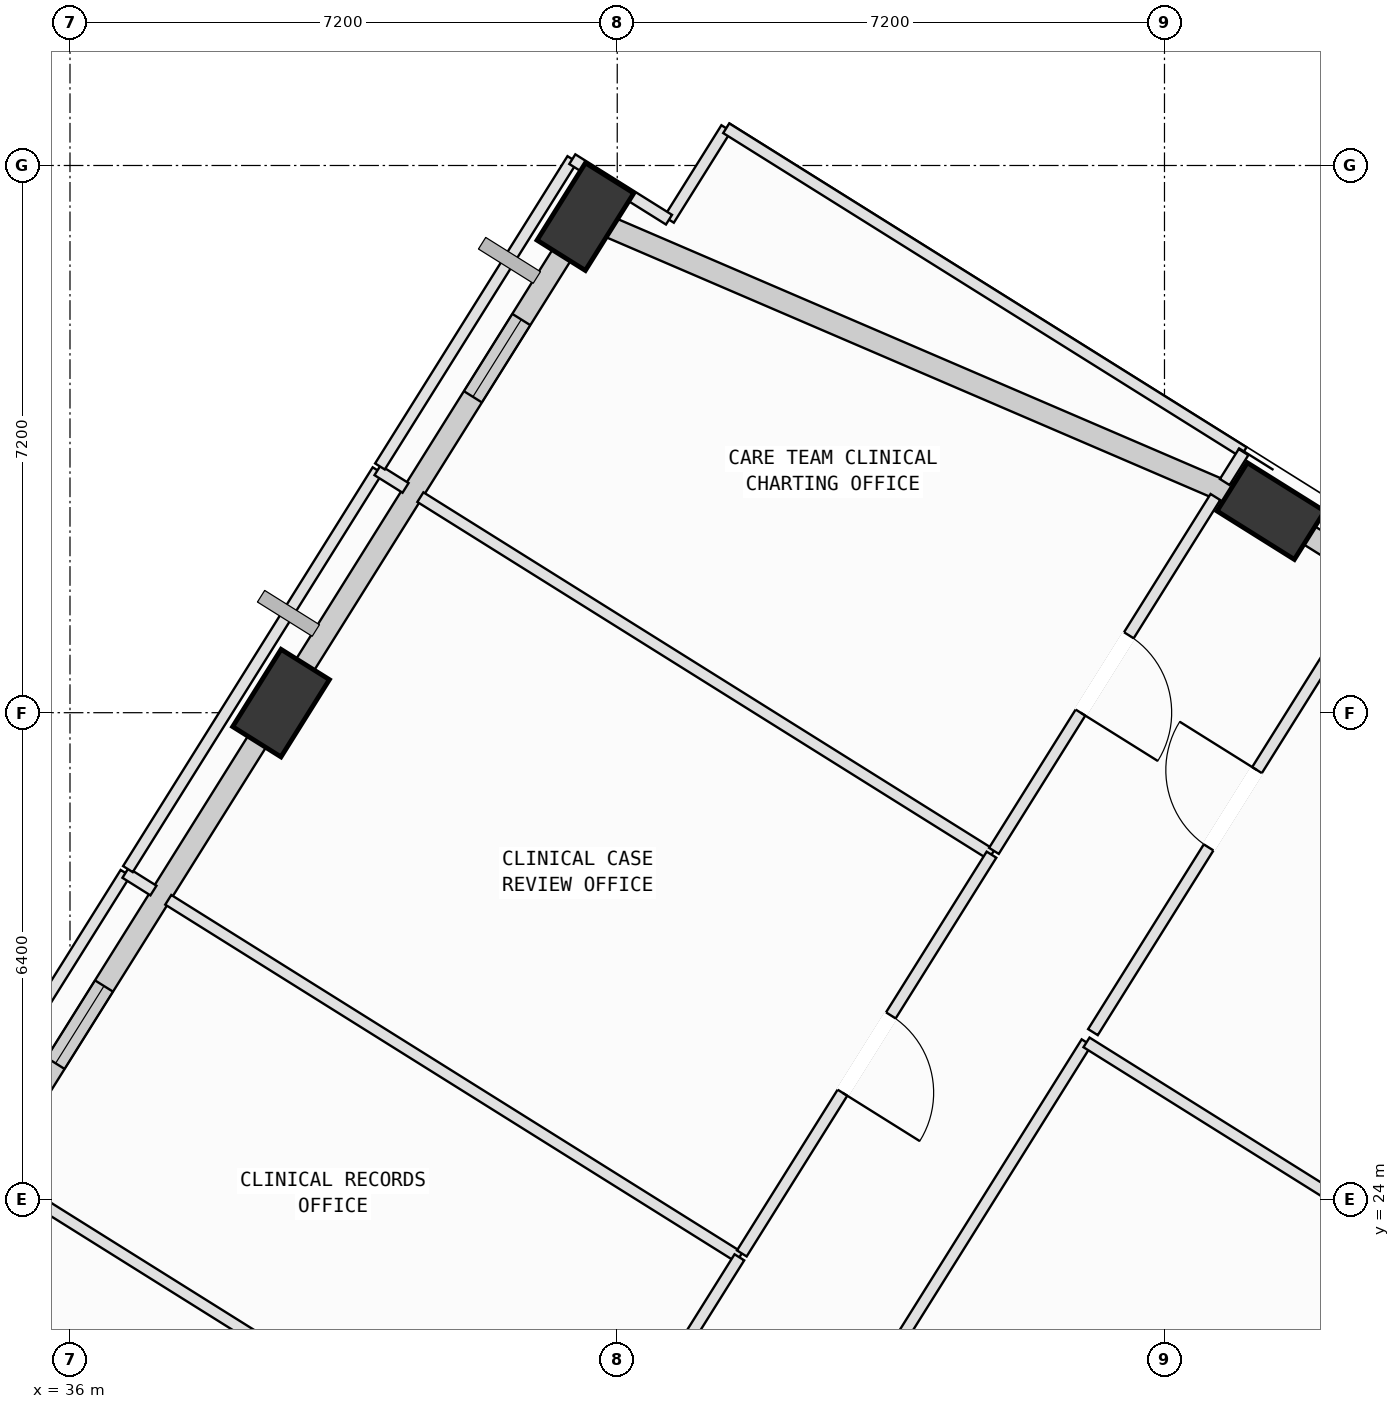
"""IFC4 building model, lengths in metres.
Left out: names, types, materials, properties, quantities, classifications, styles, units other than length and angle.
Written with IfcOpenShell. Run it as: python <this file> out.ifc"""

import sys

from ifc_helpers import new_model, si_unit, direction, frame, frame_2d, origin, origin_2d, place, context, subcontext, project, spatial, rectangle, extrude, element, fill, save


model = new_model("IFC4")
c1 = context("Model", 3, precision=1e-05, world=origin(), true_north=direction((0.0, 1.0)))
c2 = subcontext(c1, "Body", "Model", "MODEL_VIEW")
j1 = project(units=[si_unit("LENGTHUNIT", "METRE"), si_unit("PLANEANGLEUNIT", "RADIAN")], contexts=[c1])
p1 = place(None, origin())
s1 = spatial("IfcSite", under=j1, at=p1, CompositionType="ELEMENT")
p2 = place(p1, origin())
s2 = spatial("IfcBuilding", under=s1, at=p2, CompositionType="ELEMENT")
p3 = place(p2, frame((0.0, 0.0, 272.6)))
s3 = spatial("IfcBuildingStorey", under=s2, at=p3, CompositionType="ELEMENT", Elevation=272.6)
p4 = place(p3, frame((51.799, 33.053, 0.055), z_axis=(-0.034677853614, 0.074909100156, 0.996587213034), x_axis=(0.991334077794, -0.123846479581, 0.043804060302)))
e1 = element("IfcColumn", 1, at=p4, inside=s3, PredefinedType="COLUMN", context=c2, shape_type="SweptSolid", body=[
    extrude(rectangle(XDim=1.2, YDim=0.75, at=origin_2d()), origin(), (0.0, 0.0, 1.0), 3.957),
])
p5 = place(p3, frame((42.781, 36.926, 0.047), z_axis=(-0.050443698511, 0.037555271875, 0.998020558323), x_axis=(0.361618651601, -0.930801106737, 0.053303381798)))
e2 = element("IfcColumn", 2, at=p5, inside=s3, PredefinedType="COLUMN", context=c2, shape_type="SweptSolid", body=[
    extrude(rectangle(XDim=1.2, YDim=0.75, at=origin_2d()), origin(), (0.0, 0.0, 1.0), 3.959),
])
p6 = place(p3, frame((38.777, 30.526, 0.025), z_axis=(-0.023892403332, 0.021251340753, 0.999488636043), x_axis=(0.280312393395, -0.959526144156, 0.02710241301)))
e3 = element("IfcColumn", 3, at=p6, inside=s3, PredefinedType="COLUMN", context=c2, shape_type="SweptSolid", body=[
    extrude(rectangle(XDim=1.2, YDim=0.75, at=origin_2d()), origin(), (0.0, 0.0, 1.0), 3.975),
])
p7 = place(p3, frame((52.012, 32.917, 0.0), z_axis=(0.0, 0.0, 1.0), x_axis=(0.847583441626, -0.530662142499, 0.0)))
e4 = element("IfcWall", 4, at=p7, inside=s3, PredefinedType="SOLIDWALL", context=c2, shape_type="SweptSolid", body=[
    extrude(rectangle(XDim=7.046, YDim=0.28, at=frame_2d((3.523, 0.0))), origin(), (0.0, 0.0, 1.0), 3.265),
])
p8 = place(p3, frame((43.035, 36.816, 0.0), z_axis=(0.0, 0.0, 1.0), x_axis=(0.918725262251, -0.394897318935, 0.0)))
e5 = element("IfcWall", 5, at=p8, inside=s3, PredefinedType="SOLIDWALL", context=c2, shape_type="SweptSolid", body=[
    extrude(rectangle(XDim=9.036, YDim=0.28, at=frame_2d((4.518, 0.0))), origin(), (0.0, 0.0, 1.0), 3.265),
])
p9 = place(p3, frame((38.991, 30.867, 0.0), z_axis=(0.0, 0.0, 1.0), x_axis=(0.530665550712, 0.847581307774, 0.0)))
e6 = element("IfcWall", 6, at=p9, inside=s3, PredefinedType="SOLIDWALL", context=c2, shape_type="SweptSolid", body=[
    extrude(rectangle(XDim=6.78, YDim=0.28, at=frame_2d((3.39, 0.0))), origin(), (0.0, 0.0, 1.0), 2.765),
])
p10 = place(p9, frame((4.353, 0.0, 0.75)))
e7 = element("IfcOpeningElement", 7, at=p10, cuts=e6, PredefinedType="OPENING", context=c2, shape_type="SweptSolid", body=[
    extrude(rectangle(XDim=1.2, YDim=1.75, at=frame_2d((0.6, 0.875))), frame((0.0, 0.15, 0.0), z_axis=(0.0, -1.0, 0.0), x_axis=(1.0, 0.0, 0.0)), (0.0, 0.0, 1.0), 0.3),
])
p11 = place(p3, frame((35.173, 24.769, 0.0), z_axis=(0.0, 0.0, 1.0), x_axis=(0.530669842766, 0.84757862053, 0.0)))
e8 = element("IfcWall", 8, at=p11, inside=s3, PredefinedType="SOLIDWALL", context=c2, shape_type="SweptSolid", body=[
    extrude(rectangle(XDim=6.41, YDim=0.28, at=frame_2d((3.205, 0.0))), origin(), (0.0, 0.0, 1.0), 2.765),
])
p12 = place(p11, frame((1.201, 0.0, 0.75)))
e9 = element("IfcOpeningElement", 9, at=p12, cuts=e8, PredefinedType="OPENING", context=c2, shape_type="SweptSolid", body=[
    extrude(rectangle(XDim=1.2, YDim=1.75, at=frame_2d((0.6, 0.875))), frame((0.0, 0.15, 0.0), z_axis=(0.0, -1.0, 0.0), x_axis=(1.0, 0.0, 0.0)), (0.0, 0.0, 1.0), 0.3),
])
p13 = place(p3, frame((42.878, 15.687, 0.0), z_axis=(0.0, 0.0, 1.0), x_axis=(0.530687191851, 0.847567758002, 0.0)))
e10 = element("IfcWall", 10, at=p13, inside=s3, PredefinedType="PARTITIONING", context=c2, shape_type="SweptSolid", body=[
    extrude(rectangle(XDim=12.241, YDim=0.15, at=frame_2d((6.121, 0.0))), origin(), (0.0, 0.0, 1.0), 3.415),
])
p14 = place(p13, frame((5.521, 0.0, 0.0)))
e11 = element("IfcOpeningElement", 11, at=p14, cuts=e10, PredefinedType="OPENING", context=c2, shape_type="SweptSolid", body=[
    extrude(rectangle(XDim=1.2, YDim=2.15, at=frame_2d((0.6, 1.075))), frame((0.0, 0.085, 0.0), z_axis=(0.0, -1.0, 0.0), x_axis=(1.0, 0.0, 0.0)), (0.0, 0.0, 1.0), 0.17),
])
p15 = place(p3, frame((49.374, 26.062, 0.0), z_axis=(0.0, 0.0, 1.0), x_axis=(0.847573559708, -0.530677925756, 0.0)))
e12 = element("IfcWall", 12, at=p15, inside=s3, PredefinedType="PARTITIONING", context=c2, shape_type="SweptSolid", body=[
    extrude(rectangle(XDim=9.435, YDim=0.15, at=frame_2d((4.718, 0.0))), origin(), (0.0, 0.0, 1.0), 3.78),
])
p16 = place(p3, frame((49.459, 26.197, 0.0), z_axis=(0.0, 0.0, 1.0), x_axis=(0.530644342524, 0.847594585723, 0.0)))
e13 = element("IfcWall", 13, at=p16, inside=s3, PredefinedType="PARTITIONING", context=c2, shape_type="SweptSolid", body=[
    extrude(rectangle(XDim=6.935, YDim=0.15, at=frame_2d((3.467, 0.0))), origin(), (0.0, 0.0, 1.0), 3.78),
])
p17 = place(p16, frame((2.867, 0.0, 0.0)))
e14 = element("IfcOpeningElement", 14, at=p17, cuts=e13, PredefinedType="OPENING", context=c2, shape_type="SweptSolid", body=[
    extrude(rectangle(XDim=1.2, YDim=2.15, at=frame_2d((0.6, 1.075))), frame((0.0, 0.085, 0.0), z_axis=(0.0, -1.0, 0.0), x_axis=(1.0, 0.0, 0.0)), (0.0, 0.0, 1.0), 0.17),
])
p18 = place(p3, frame((34.462, 24.67, 0.0), z_axis=(0.0, 0.0, 1.0), x_axis=(0.847549004831, -0.53071714162, 0.0)))
e15 = element("IfcWall", 15, at=p18, inside=s3, PredefinedType="PARTITIONING", context=c2, shape_type="SweptSolid", body=[
    extrude(rectangle(XDim=9.5, YDim=0.15, at=frame_2d((4.75, 0.0))), origin(), (0.0, 0.0, 1.0), 3.78),
])
p19 = place(p3, frame((34.473, 24.687, 0.0), z_axis=(0.0, 0.0, 1.0), x_axis=(0.530772811919, 0.84751414273, 0.0)))
e16 = element("IfcWall", 16, at=p19, inside=s3, PredefinedType="PARTITIONING", context=c2, shape_type="SweptSolid", body=[
    extrude(rectangle(XDim=4.252, YDim=0.15, at=frame_2d((2.126, 0.0))), origin(), (0.0, 0.0, 1.0), 3.78),
])
p20 = place(p3, frame((36.73, 28.291, 0.0), z_axis=(0.0, 0.0, 1.0), x_axis=(0.846954729699, -0.531665012804, 0.0)))
e17 = element("IfcWall", 17, at=p20, inside=s3, PredefinedType="PARTITIONING", context=c2, shape_type="SweptSolid", body=[
    extrude(rectangle(XDim=0.434, YDim=0.15, at=frame_2d((0.217, 0.0))), origin(), (0.0, 0.0, 1.0), 3.78),
])
p21 = place(p3, frame((37.293, 27.938, 0.0), z_axis=(0.0, 0.0, 1.0), x_axis=(0.847597339737, -0.530639943531, 0.0)))
e18 = element("IfcWall", 18, at=p21, inside=s3, PredefinedType="PARTITIONING", context=c2, shape_type="SweptSolid", body=[
    extrude(rectangle(XDim=8.865, YDim=0.15, at=frame_2d((4.433, 0.0))), origin(), (0.0, 0.0, 1.0), 3.78),
])
p22 = place(p3, frame((44.807, 23.234, 0.0), z_axis=(0.0, 0.0, 1.0), x_axis=(-0.530702319906, -0.847558285693, 0.0)))
e19 = element("IfcWall", 19, at=p22, inside=s3, PredefinedType="PARTITIONING", context=c2, shape_type="SweptSolid", body=[
    extrude(rectangle(XDim=4.273, YDim=0.15, at=frame_2d((2.137, 0.0))), origin(), (0.0, 0.0, 1.0), 3.78),
])
p23 = place(p22, frame((1.537, 0.0, 0.0)))
e20 = element("IfcOpeningElement", 20, at=p23, cuts=e19, PredefinedType="OPENING", context=c2, shape_type="SweptSolid", body=[
    extrude(rectangle(XDim=1.2, YDim=2.15, at=frame_2d((0.6, 1.075))), frame((0.0, 0.085, 0.0), z_axis=(0.0, -1.0, 0.0), x_axis=(1.0, 0.0, 0.0)), (0.0, 0.0, 1.0), 0.17),
])
p24 = place(p3, frame((36.762, 28.342, 0.0), z_axis=(0.0, 0.0, 1.0), x_axis=(0.530523539414, 0.847670203634, 0.0)))
e21 = element("IfcWall", 21, at=p24, inside=s3, PredefinedType="PARTITIONING", context=c2, shape_type="SweptSolid", body=[
    extrude(rectangle(XDim=6.19, YDim=0.15, at=frame_2d((3.095, 0.0))), origin(), (0.0, 0.0, 1.0), 2.765),
])
p25 = place(p3, frame((40.046, 33.589, 0.0), z_axis=(0.0, 0.0, 1.0), x_axis=(0.847494089862, -0.530804830092, 0.0)))
e22 = element("IfcWall", 22, at=p25, inside=s3, PredefinedType="PARTITIONING", context=c2, shape_type="SweptSolid", body=[
    extrude(rectangle(XDim=0.436, YDim=0.15, at=frame_2d((0.218, 0.0))), origin(), (0.0, 0.0, 1.0), 3.78),
])
p26 = place(p3, frame((40.61, 33.236, 0.0), z_axis=(0.0, 0.0, 1.0), x_axis=(0.847597339737, -0.530639943531, 0.0)))
e23 = element("IfcWall", 23, at=p26, inside=s3, PredefinedType="PARTITIONING", context=c2, shape_type="SweptSolid", body=[
    extrude(rectangle(XDim=8.865, YDim=0.15, at=frame_2d((4.433, 0.0))), origin(), (0.0, 0.0, 1.0), 3.78),
])
p27 = place(p3, frame((48.124, 28.532, 0.0), z_axis=(0.0, 0.0, 1.0), x_axis=(-0.530636886246, -0.847599253749, 0.0)))
e24 = element("IfcWall", 24, at=p27, inside=s3, PredefinedType="PARTITIONING", context=c2, shape_type="SweptSolid", body=[
    extrude(rectangle(XDim=6.19, YDim=0.15, at=frame_2d((3.095, 0.0))), origin(), (0.0, 0.0, 1.0), 3.78),
])
p28 = place(p27, frame((2.495, 0.0, 0.0)))
e25 = element("IfcOpeningElement", 25, at=p28, cuts=e24, PredefinedType="OPENING", context=c2, shape_type="SweptSolid", body=[
    extrude(rectangle(XDim=1.2, YDim=2.15, at=frame_2d((0.6, 1.075))), frame((0.0, 0.085, 0.0), z_axis=(0.0, -1.0, 0.0), x_axis=(1.0, 0.0, 0.0)), (0.0, 0.0, 1.0), 0.17),
])
p29 = place(p3, frame((43.881, 36.887, 0.0), z_axis=(0.0, 0.0, 1.0), x_axis=(0.530493633922, 0.847688919574, 0.0)))
e26 = element("IfcWall", 26, at=p29, inside=s3, PredefinedType="PARTITIONING", context=c2, shape_type="SweptSolid", body=[
    extrude(rectangle(XDim=1.419, YDim=0.15, at=frame_2d((0.709, 0.0))), origin(), (0.0, 0.0, 1.0), 3.78),
])
p30 = place(p3, frame((44.634, 38.09, 0.0), z_axis=(0.0, 0.0, 1.0), x_axis=(0.847589810527, -0.530651969836, 0.0)))
e27 = element("IfcWall", 27, at=p30, inside=s3, PredefinedType="PARTITIONING", context=c2, shape_type="SweptSolid", body=[
    extrude(rectangle(XDim=8.03, YDim=0.15, at=frame_2d((4.015, 0.0))), origin(), (0.0, 0.0, 1.0), 3.265),
])
p31 = place(p3, frame((51.44, 33.829, 0.0), z_axis=(0.0, 0.0, 1.0), x_axis=(-0.530848229426, -0.847466906324, 0.0)))
e28 = element("IfcWall", 28, at=p31, inside=s3, PredefinedType="PARTITIONING", context=c2, shape_type="SweptSolid", body=[
    extrude(rectangle(XDim=0.465, YDim=0.15, at=frame_2d((0.232, 0.0))), origin(), (0.0, 0.0, 1.0), 2.765),
])
p32 = place(p3, frame((51.07, 33.238, 0.0), z_axis=(0.0, 0.0, 1.0), x_axis=(-0.530530213169, -0.847666026755, 0.0)))
e29 = element("IfcWall", 29, at=p32, inside=s3, PredefinedType="PARTITIONING", context=c2, shape_type="SweptSolid", body=[
    extrude(rectangle(XDim=5.493, YDim=0.15, at=frame_2d((2.746, 0.0))), origin(), (0.0, 0.0, 1.0), 2.765),
])
p33 = place(p32, frame((2.146, 0.0, 0.0)))
e30 = element("IfcOpeningElement", 30, at=p33, cuts=e29, PredefinedType="OPENING", context=c2, shape_type="SweptSolid", body=[
    extrude(rectangle(XDim=1.2, YDim=2.15, at=frame_2d((0.6, 1.075))), frame((0.0, 0.085, 0.0), z_axis=(0.0, -1.0, 0.0), x_axis=(1.0, 0.0, 0.0)), (0.0, 0.0, 1.0), 0.17),
])
p34 = place(p3, frame((40.078, 33.64, 0.0), z_axis=(0.0, 0.0, 1.0), x_axis=(0.530601485955, 0.847621414962, 0.0)))
e31 = element("IfcWall", 31, at=p34, inside=s3, PredefinedType="PARTITIONING", context=c2, shape_type="SweptSolid", body=[
    extrude(rectangle(XDim=4.77, YDim=0.15, at=frame_2d((2.385, 0.0))), origin(), (0.0, 0.0, 1.0), 3.265),
])
p35 = place(p3, frame((42.609, 37.683, 0.0), z_axis=(0.0, 0.0, 1.0), x_axis=(0.847696579244, -0.53048139415, 0.0)))
e32 = element("IfcWall", 32, at=p35, inside=s3, PredefinedType="PARTITIONING", context=c2, shape_type="SweptSolid", body=[
    extrude(rectangle(XDim=1.501, YDim=0.15, at=frame_2d((0.75, 0.0))), origin(), (0.0, 0.0, 1.0), 3.265),
])
p36 = place(p10, origin())
e33 = element("IfcWindow", 33, at=p36, inside=s3, PartitioningType="SINGLE_PANEL", PredefinedType="WINDOW", context=c2, shape_type="SweptSolid", body=[
    extrude(rectangle(XDim=1.2, YDim=1.75, at=frame_2d((0.6, 0.875))), frame((0.0, 0.03, 0.0), z_axis=(0.0, -1.0, 0.0), x_axis=(1.0, 0.0, 0.0)), (0.0, 0.0, 1.0), 0.06),
])
fill(e7, e33)
p37 = place(p12, origin())
e34 = element("IfcWindow", 34, at=p37, inside=s3, PartitioningType="SINGLE_PANEL", PredefinedType="WINDOW", context=c2, shape_type="SweptSolid", body=[
    extrude(rectangle(XDim=1.2, YDim=1.75, at=frame_2d((0.6, 0.875))), frame((0.0, 0.03, 0.0), z_axis=(0.0, -1.0, 0.0), x_axis=(1.0, 0.0, 0.0)), (0.0, 0.0, 1.0), 0.06),
])
fill(e9, e34)
p38 = place(p17, origin())
e35 = element("IfcDoor", 35, at=p38, inside=s3, OperationType="SINGLE_SWING_RIGHT", PredefinedType="DOOR", context=c2, shape_type="SweptSolid", body=[
    extrude(rectangle(XDim=1.2, YDim=2.15, at=frame_2d((0.6, 1.075))), frame((0.0, 0.025, 0.0), z_axis=(0.0, -1.0, 0.0), x_axis=(1.0, 0.0, 0.0)), (0.0, 0.0, 1.0), 0.05),
])
fill(e14, e35)
p39 = place(p28, origin())
e36 = element("IfcDoor", 36, at=p39, inside=s3, OperationType="SINGLE_SWING_RIGHT", PredefinedType="DOOR", context=c2, shape_type="SweptSolid", body=[
    extrude(rectangle(XDim=1.2, YDim=2.15, at=frame_2d((0.6, 1.075))), frame((0.0, 0.025, 0.0), z_axis=(0.0, -1.0, 0.0), x_axis=(1.0, 0.0, 0.0)), (0.0, 0.0, 1.0), 0.05),
])
fill(e25, e36)
p40 = place(p33, origin())
e37 = element("IfcDoor", 37, at=p40, inside=s3, OperationType="SINGLE_SWING_RIGHT", PredefinedType="DOOR", context=c2, shape_type="SweptSolid", body=[
    extrude(rectangle(XDim=1.2, YDim=2.15, at=frame_2d((0.6, 1.075))), frame((0.0, 0.025, 0.0), z_axis=(0.0, -1.0, 0.0), x_axis=(1.0, 0.0, 0.0)), (0.0, 0.0, 1.0), 0.05),
])
fill(e30, e37)
save(model, sys.argv[1])
